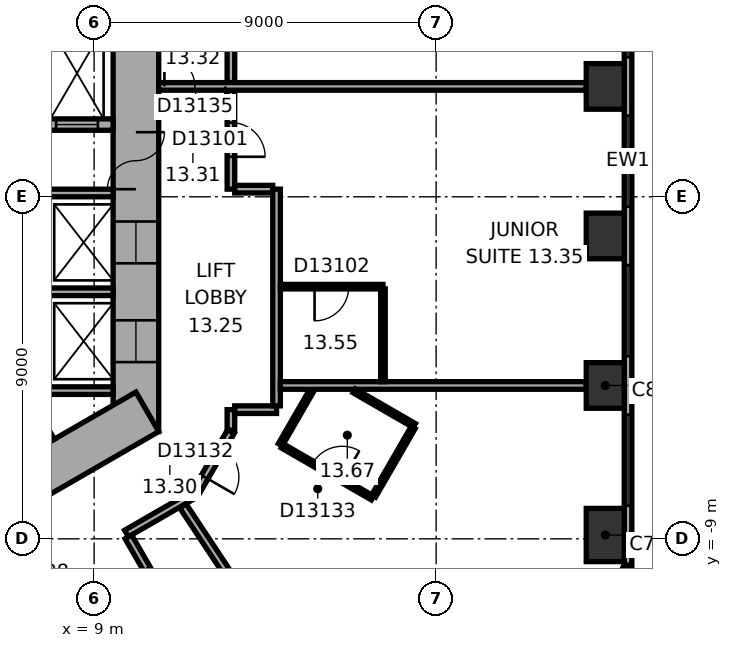
"""IFC4 building model, lengths in metres.
Left out: names, types, materials, properties, quantities, classifications, styles, units other than length and angle.
Written with IfcOpenShell. Run it as: python <this file> out.ifc"""

import sys

from ifc_helpers import new_model, si_unit, direction, frame, frame_2d, origin, origin_2d, place, context, subcontext, project, spatial, rectangle, extrude, element, fill, save


model = new_model("IFC4")
c1 = context("Model", 3, precision=1e-05, world=origin(), true_north=direction((0.0, 1.0)))
c2 = subcontext(c1, "Body", "Model", "MODEL_VIEW")
j1 = project(units=[si_unit("LENGTHUNIT", "METRE"), si_unit("PLANEANGLEUNIT", "RADIAN")], contexts=[c1])
p1 = place(None, origin())
s1 = spatial("IfcSite", under=j1, at=p1, CompositionType="ELEMENT")
p2 = place(p1, origin())
s2 = spatial("IfcBuilding", under=s1, at=p2, CompositionType="ELEMENT")
p3 = place(p2, frame((0.0, 0.0, 63.8)))
s3 = spatial("IfcBuildingStorey", under=s2, at=p3, CompositionType="ELEMENT", Elevation=63.8)
p4 = place(p3, frame((22.45, -8.899, 0.0), z_axis=(0.0, 0.0, 1.0), x_axis=(0.0, 1.0, 0.0)))
e1 = element("IfcColumn", 1, at=p4, inside=s3, PredefinedType="COLUMN", context=c2, shape_type="SweptSolid", body=[
    extrude(rectangle(XDim=1.4, YDim=1.0, at=origin_2d()), origin(), (0.0, 0.0, 1.0), 3.3),
])
for number, where, z_axis, x_axis in (
    (2, (22.45, -4.965, 0.0), (0.0, 0.0, 1.0), (0.0, 1.0, 0.0)),
    (3, (22.45, -1.03, 0.0), (0.0, 0.0, 1.0), (0.0, 1.0, 0.0)),
    (4, (22.45, 2.905, 0.0), (0.0, 0.0, 1.0), (0.0, 1.0, 0.0)),
):
    element("IfcColumn", number, at=place(p3, frame(where, z_axis=z_axis, x_axis=x_axis)), inside=s3, PredefinedType="COLUMN", context=c2, shape_type="SweptSolid", body=[
        extrude(rectangle(XDim=1.2, YDim=1.0, at=origin_2d()), origin(), (0.0, 0.0, 1.0), 3.3),
    ])
p5 = place(p3, frame((10.1, -6.177, 0.0), z_axis=(0.0, 0.0, 1.0), x_axis=(0.0, 1.0, 0.0)))
e5 = element("IfcWall", 5, at=p5, inside=s3, PredefinedType="SHEAR", context=c2, shape_type="SweptSolid", body=[
    extrude(rectangle(XDim=12.355, YDim=1.2, at=frame_2d((6.177, 0.0))), origin(), (0.0, 0.0, 1.0), 3.3),
])
p6 = place(p5, frame((6.378, 0.0, 0.0)))
e6 = element("IfcOpeningElement", 6, at=p6, cuts=e5, PredefinedType="OPENING", context=c2, shape_type="SweptSolid", body=[
    extrude(rectangle(XDim=1.5, YDim=2.1, at=frame_2d((0.75, 1.05))), frame((0.0, 0.61, 0.0), z_axis=(0.0, -1.0, 0.0), x_axis=(1.0, 0.0, 0.0)), (0.0, 0.0, 1.0), 1.22),
])
p7 = place(p5, frame((1.828, 0.0, 0.0)))
e7 = element("IfcOpeningElement", 7, at=p7, cuts=e5, PredefinedType="OPENING", context=c2, shape_type="SweptSolid", body=[
    extrude(rectangle(XDim=1.1, YDim=2.1, at=frame_2d((0.55, 1.05))), frame((0.0, 0.61, 0.0), z_axis=(0.0, -1.0, 0.0), x_axis=(1.0, 0.0, 0.0)), (0.0, 0.0, 1.0), 1.22),
])
p8 = place(p5, frame((4.427, 0.0, 0.0)))
e8 = element("IfcOpeningElement", 8, at=p8, cuts=e5, PredefinedType="OPENING", context=c2, shape_type="SweptSolid", body=[
    extrude(rectangle(XDim=1.1, YDim=2.1, at=frame_2d((0.55, 1.05))), frame((0.0, 0.61, 0.0), z_axis=(0.0, -1.0, 0.0), x_axis=(1.0, 0.0, 0.0)), (0.0, 0.0, 1.0), 1.22),
])
p9 = place(p3, frame((-0.3, -11.836, 0.0), z_axis=(0.0, 0.0, 1.0), x_axis=(0.866021384402, 0.500006961711, 0.0)))
e9 = element("IfcWall", 9, at=p9, inside=s3, PredefinedType="SHEAR", context=c2, shape_type="SweptSolid", body=[
    extrude(rectangle(XDim=12.355, YDim=1.2, at=frame_2d((6.178, 0.0))), origin(), (0.0, 0.0, 1.0), 3.3),
])
p10 = place(p9, frame((4.128, 0.0, 0.0)))
e10 = element("IfcOpeningElement", 10, at=p10, cuts=e9, PredefinedType="OPENING", context=c2, shape_type="SweptSolid", body=[
    extrude(rectangle(XDim=0.9, YDim=2.1, at=frame_2d((0.45, 1.05))), frame((0.0, 0.61, 0.0), z_axis=(0.0, -1.0, 0.0), x_axis=(1.0, 0.0, 0.0)), (0.0, 0.0, 1.0), 1.22),
])
p11 = place(p9, frame((7.928, 0.0, 0.0)))
e11 = element("IfcOpeningElement", 11, at=p11, cuts=e9, PredefinedType="OPENING", context=c2, shape_type="SweptSolid", body=[
    extrude(rectangle(XDim=1.1, YDim=2.1, at=frame_2d((0.55, 1.05))), frame((0.0, 0.61, 0.0), z_axis=(0.0, -1.0, 0.0), x_axis=(1.0, 0.0, 0.0)), (0.0, 0.0, 1.0), 1.22),
])
p12 = place(p3, frame((23.05, -9.687, 0.0), z_axis=(0.0, 0.0, 1.0), x_axis=(0.0, 1.0, 0.0)))
e12 = element("IfcWall", 12, at=p12, inside=s3, PredefinedType="STANDARD", context=c2, shape_type="SweptSolid", body=[
    extrude(rectangle(XDim=21.246, YDim=0.2, at=frame_2d((10.623, 0.0))), origin(), (0.0, 0.0, 1.0), 3.3),
])
p13 = place(p12, frame((1.555, 0.0, 0.8)))
e13 = element("IfcOpeningElement", 13, at=p13, cuts=e12, PredefinedType="OPENING", context=c2, shape_type="SweptSolid", body=[
    extrude(rectangle(XDim=2.4, YDim=1.7, at=frame_2d((1.2, 0.85))), frame((0.0, 0.11, 0.0), z_axis=(0.0, -1.0, 0.0), x_axis=(1.0, 0.0, 0.0)), (0.0, 0.0, 1.0), 0.22),
])
p14 = place(p12, frame((5.489, 0.0, 0.8)))
e14 = element("IfcOpeningElement", 14, at=p14, cuts=e12, PredefinedType="OPENING", context=c2, shape_type="SweptSolid", body=[
    extrude(rectangle(XDim=2.4, YDim=1.7, at=frame_2d((1.2, 0.85))), frame((0.0, 0.11, 0.0), z_axis=(0.0, -1.0, 0.0), x_axis=(1.0, 0.0, 0.0)), (0.0, 0.0, 1.0), 0.22),
])
p15 = place(p12, frame((9.424, 0.0, 0.8)))
e15 = element("IfcOpeningElement", 15, at=p15, cuts=e12, PredefinedType="OPENING", context=c2, shape_type="SweptSolid", body=[
    extrude(rectangle(XDim=2.4, YDim=1.7, at=frame_2d((1.2, 0.85))), frame((0.0, 0.11, 0.0), z_axis=(0.0, -1.0, 0.0), x_axis=(1.0, 0.0, 0.0)), (0.0, 0.0, 1.0), 0.22),
])
p16 = place(p12, frame((13.358, 0.0, 0.8)))
e16 = element("IfcOpeningElement", 16, at=p16, cuts=e12, PredefinedType="OPENING", context=c2, shape_type="SweptSolid", body=[
    extrude(rectangle(XDim=2.4, YDim=1.7, at=frame_2d((1.2, 0.85))), frame((0.0, 0.11, 0.0), z_axis=(0.0, -1.0, 0.0), x_axis=(1.0, 0.0, 0.0)), (0.0, 0.0, 1.0), 0.22),
])
p17 = place(p12, frame((17.293, 0.0, 0.8)))
e17 = element("IfcOpeningElement", 17, at=p17, cuts=e12, PredefinedType="OPENING", context=c2, shape_type="SweptSolid", body=[
    extrude(rectangle(XDim=2.4, YDim=1.7, at=frame_2d((1.2, 0.85))), frame((0.0, 0.11, 0.0), z_axis=(0.0, -1.0, 0.0), x_axis=(1.0, 0.0, 0.0)), (0.0, 0.0, 1.0), 0.22),
])
p18 = place(p3, frame((20.833, -13.839, 0.0), z_axis=(0.0, 0.0, 1.0), x_axis=(0.473321668581, 0.880889662813, 0.0)))
e18 = element("IfcWall", 18, at=p18, inside=s3, PredefinedType="STANDARD", context=c2, shape_type="SweptSolid", body=[
    extrude(rectangle(XDim=4.66, YDim=0.2, at=frame_2d((2.33, 0.0))), origin(), (0.0, 0.0, 1.0), 3.3),
])
p19 = place(p18, frame((0.83, 0.0, 0.8)))
e19 = element("IfcOpeningElement", 19, at=p19, cuts=e18, PredefinedType="OPENING", context=c2, shape_type="SweptSolid", body=[
    extrude(rectangle(XDim=3.0, YDim=1.7, at=frame_2d((1.5, 0.85))), frame((0.0, 0.11, 0.0), z_axis=(0.0, -1.0, 0.0), x_axis=(1.0, 0.0, 0.0)), (0.0, 0.0, 1.0), 0.22),
])
for number, where, z_axis, x_axis in (
    (20, (7.3, -5.1, 0.0), (0.0, 0.0, 1.0), (1.0, 0.0, 0.0)),
    (21, (7.3, -2.5, 0.0), (0.0, 0.0, 1.0), (1.0, 0.0, 0.0)),
    (22, (7.3, 0.1, 0.0), (0.0, 0.0, 1.0), (1.0, 0.0, 0.0)),
    (23, (6.768, -4.522, 0.0), (0.0, 0.0, 1.0), (0.5, -0.866, 0.0)),
):
    element("IfcWall", number, at=place(p3, frame(where, z_axis=z_axis, x_axis=x_axis)), inside=s3, PredefinedType="PARTITIONING", context=c2, shape_type="SweptSolid", body=[
        extrude(rectangle(XDim=2.2, YDim=0.2, at=frame_2d((1.1, 0.0))), origin(), (0.0, 0.0, 1.0), 3.05),
    ])
p20 = place(p3, frame((7.3, 1.9, 0.0), z_axis=(0.0, 0.0, 1.0), x_axis=(1.0, 0.0, 0.0)))
e24 = element("IfcWall", 24, at=p20, inside=s3, PredefinedType="SHEAR", context=c2, shape_type="SweptSolid", body=[
    extrude(rectangle(XDim=2.2, YDim=0.3, at=frame_2d((1.1, 0.0))), origin(), (0.0, 0.0, 1.0), 3.05),
])
p21 = place(p20, frame((0.7, 0.0, 0.0)))
e25 = element("IfcOpeningElement", 25, at=p21, cuts=e24, PredefinedType="OPENING", context=c2, shape_type="SweptSolid", body=[
    extrude(rectangle(XDim=1.1, YDim=2.1, at=frame_2d((0.55, 1.05))), frame((0.0, 0.16, 0.0), z_axis=(0.0, -1.0, 0.0), x_axis=(1.0, 0.0, 0.0)), (0.0, 0.0, 1.0), 0.32),
])
p22 = place(p3, frame((9.852, -8.861, 0.0), z_axis=(0.0, 0.0, 1.0), x_axis=(0.866013291437, 0.500020978615, 0.0)))
e26 = element("IfcWall", 26, at=p22, inside=s3, PredefinedType="PARTITIONING", context=c2, shape_type="SweptSolid", body=[
    extrude(rectangle(XDim=2.077, YDim=0.2, at=frame_2d((1.038, 0.0))), origin(), (0.0, 0.0, 1.0), 3.05),
])
p23 = place(p3, frame((10.402, -9.815, 0.0), z_axis=(0.0, 0.0, 1.0), x_axis=(-0.499968756647, 0.866043441391, 0.0)))
e27 = element("IfcWall", 27, at=p23, inside=s3, PredefinedType="PARTITIONING", context=c2, shape_type="SweptSolid", body=[
    extrude(rectangle(XDim=1.001, YDim=0.2, at=frame_2d((0.5, 0.0))), origin(), (0.0, 0.0, 1.0), 3.05),
])
p24 = place(p3, frame((11.67, -7.788, 0.0), z_axis=(0.0, 0.0, 1.0), x_axis=(0.500063286585, 0.865988862174, 0.0)))
e28 = element("IfcWall", 28, at=p24, inside=s3, PredefinedType="PARTITIONING", context=c2, shape_type="SweptSolid", body=[
    extrude(rectangle(XDim=1.86, YDim=0.2, at=frame_2d((0.93, 0.0))), origin(), (0.0, 0.0, 1.0), 3.05),
])
p25 = place(p24, frame((0.48, 0.0, 0.0)))
e29 = element("IfcOpeningElement", 29, at=p25, cuts=e28, PredefinedType="OPENING", context=c2, shape_type="SweptSolid", body=[
    extrude(rectangle(XDim=0.9, YDim=2.1, at=frame_2d((0.45, 1.05))), frame((0.0, 0.11, 0.0), z_axis=(0.0, -1.0, 0.0), x_axis=(1.0, 0.0, 0.0)), (0.0, 0.0, 1.0), 0.22),
])
p26 = place(p3, frame((12.6, -6.138, 0.0), z_axis=(0.0, 0.0, 1.0), x_axis=(0.0, 1.0, 0.0)))
e30 = element("IfcWall", 30, at=p26, inside=s3, PredefinedType="PARTITIONING", context=c2, shape_type="SweptSolid", body=[
    extrude(rectangle(XDim=0.537, YDim=0.2, at=frame_2d((0.268, 0.0))), origin(), (0.0, 0.0, 1.0), 3.05),
])
p27 = place(p3, frame((12.6, 0.201, 0.0), z_axis=(0.0, 0.0, 1.0), x_axis=(0.0, 1.0, 0.0)))
e31 = element("IfcWall", 31, at=p27, inside=s3, PredefinedType="PARTITIONING", context=c2, shape_type="SweptSolid", body=[
    extrude(rectangle(XDim=2.604, YDim=0.2, at=frame_2d((1.302, 0.0))), origin(), (0.0, 0.0, 1.0), 3.05),
])
p28 = place(p27, frame((0.852, 0.0, 0.0)))
e32 = element("IfcOpeningElement", 32, at=p28, cuts=e31, PredefinedType="OPENING", context=c2, shape_type="SweptSolid", body=[
    extrude(rectangle(XDim=0.9, YDim=2.1, at=frame_2d((0.45, 1.05))), frame((0.0, 0.11, 0.0), z_axis=(0.0, -1.0, 0.0), x_axis=(1.0, 0.0, 0.0)), (0.0, 0.0, 1.0), 0.22),
])
p29 = place(p3, frame((12.6, 3.004, 0.0), z_axis=(0.0, 0.0, 1.0), x_axis=(0.0, 1.0, 0.0)))
e33 = element("IfcWall", 33, at=p29, inside=s3, PredefinedType="PARTITIONING", context=c2, shape_type="SweptSolid", body=[
    extrude(rectangle(XDim=3.173, YDim=0.2, at=frame_2d((1.586, 0.0))), origin(), (0.0, 0.0, 1.0), 3.05),
])
p30 = place(p29, frame((1.136, 0.0, 0.0)))
e34 = element("IfcOpeningElement", 34, at=p30, cuts=e33, PredefinedType="OPENING", context=c2, shape_type="SweptSolid", body=[
    extrude(rectangle(XDim=0.9, YDim=2.1, at=frame_2d((0.45, 1.05))), frame((0.0, 0.11, 0.0), z_axis=(0.0, -1.0, 0.0), x_axis=(1.0, 0.0, 0.0)), (0.0, 0.0, 1.0), 0.22),
])
p31 = place(p3, frame((12.7, -5.601, 0.0), z_axis=(0.0, 0.0, 1.0), x_axis=(1.0, 0.0, 0.0)))
e35 = element("IfcWall", 35, at=p31, inside=s3, PredefinedType="PARTITIONING", context=c2, shape_type="SweptSolid", body=[
    extrude(rectangle(XDim=1.101, YDim=0.2, at=frame_2d((0.551, 0.0))), origin(), (0.0, 0.0, 1.0), 3.05),
])
p32 = place(p3, frame((13.701, 0.201, 0.0), z_axis=(0.0, 0.0, 1.0), x_axis=(-1.0, 0.0, 0.0)))
e36 = element("IfcWall", 36, at=p32, inside=s3, PredefinedType="PARTITIONING", context=c2, shape_type="SweptSolid", body=[
    extrude(rectangle(XDim=1.001, YDim=0.2, at=frame_2d((0.5, 0.0))), origin(), (0.0, 0.0, 1.0), 3.05),
])
p33 = place(p3, frame((13.801, -5.501, 0.0), z_axis=(0.0, 0.0, 1.0), x_axis=(0.0, 1.0, 0.0)))
e37 = element("IfcWall", 37, at=p33, inside=s3, PredefinedType="PARTITIONING", context=c2, shape_type="SweptSolid", body=[
    extrude(rectangle(XDim=5.702, YDim=0.2, at=frame_2d((2.851, 0.0))), origin(), (0.0, 0.0, 1.0), 3.05),
])
p34 = place(p3, frame((13.901, -6.524, 0.0), z_axis=(0.0, 0.0, 1.0), x_axis=(0.499964162598, 0.86604609353, 0.0)))
e38 = element("IfcWall", 38, at=p34, inside=s3, PredefinedType="PARTITIONING", context=c2, shape_type="SweptSolid", body=[
    extrude(rectangle(XDim=1.661, YDim=0.12, at=frame_2d((0.831, 0.0))), origin(), (0.0, 0.0, 1.0), 3.05),
])
p35 = place(p3, frame((13.901, -4.965, 0.0), z_axis=(0.0, 0.0, 1.0), x_axis=(1.0, 0.0, 0.0)))
e39 = element("IfcWall", 39, at=p35, inside=s3, PredefinedType="PARTITIONING", context=c2, shape_type="SweptSolid", body=[
    extrude(rectangle(XDim=8.049, YDim=0.2, at=frame_2d((4.024, 0.0))), origin(), (0.0, 0.0, 1.0), 3.05),
])
p36 = place(p3, frame((13.901, -2.365, 0.0), z_axis=(0.0, 0.0, 1.0), x_axis=(1.0, 0.0, 0.0)))
e40 = element("IfcWall", 40, at=p36, inside=s3, PredefinedType="PARTITIONING", context=c2, shape_type="SweptSolid", body=[
    extrude(rectangle(XDim=2.7, YDim=0.12, at=frame_2d((1.35, 0.0))), origin(), (0.0, 0.0, 1.0), 3.05),
])
p37 = place(p36, frame((0.9, 0.0, 0.0)))
e41 = element("IfcOpeningElement", 41, at=p37, cuts=e40, PredefinedType="OPENING", context=c2, shape_type="SweptSolid", body=[
    extrude(rectangle(XDim=0.9, YDim=2.1, at=frame_2d((0.45, 1.05))), frame((0.0, 0.07, 0.0), z_axis=(0.0, -1.0, 0.0), x_axis=(1.0, 0.0, 0.0)), (0.0, 0.0, 1.0), 0.14),
])
p38 = place(p3, frame((15.841, -5.104, 0.0), z_axis=(0.0, 0.0, 1.0), x_axis=(0.866025591402, -0.499999675036, 0.0)))
e42 = element("IfcWall", 42, at=p38, inside=s3, PredefinedType="PARTITIONING", context=c2, shape_type="SweptSolid", body=[
    extrude(rectangle(XDim=1.83, YDim=0.12, at=frame_2d((0.915, 0.0))), origin(), (0.0, 0.0, 1.0), 3.05),
])
p39 = place(p3, frame((16.255, -15.564, 0.0), z_axis=(0.0, 0.0, 1.0), x_axis=(-0.55192208744, 0.833895682562, 0.0)))
e43 = element("IfcWall", 43, at=p39, inside=s3, PredefinedType="PARTITIONING", context=c2, shape_type="SweptSolid", body=[
    extrude(rectangle(XDim=8.913, YDim=0.2, at=frame_2d((4.457, 0.0))), origin(), (0.0, 0.0, 1.0), 2.6),
])
p40 = place(p3, frame((16.326, -7.925, 0.0), z_axis=(0.0, 0.0, 1.0), x_axis=(-0.865997131366, 0.500048966069, 0.0)))
e44 = element("IfcWall", 44, at=p40, inside=s3, PredefinedType="PARTITIONING", context=c2, shape_type="SweptSolid", body=[
    extrude(rectangle(XDim=2.74, YDim=0.12, at=frame_2d((1.37, 0.0))), origin(), (0.0, 0.0, 1.0), 3.05),
])
p41 = place(p40, frame((0.92, 0.0, 0.0)))
e45 = element("IfcOpeningElement", 45, at=p41, cuts=e44, PredefinedType="OPENING", context=c2, shape_type="SweptSolid", body=[
    extrude(rectangle(XDim=0.9, YDim=2.1, at=frame_2d((0.45, 1.05))), frame((0.0, 0.07, 0.0), z_axis=(0.0, -1.0, 0.0), x_axis=(1.0, 0.0, 0.0)), (0.0, 0.0, 1.0), 0.14),
])
p42 = place(p3, frame((16.601, -2.425, 0.0), z_axis=(0.0, 0.0, 1.0), x_axis=(0.0, -1.0, 0.0)))
e46 = element("IfcWall", 46, at=p42, inside=s3, PredefinedType="PARTITIONING", context=c2, shape_type="SweptSolid", body=[
    extrude(rectangle(XDim=2.44, YDim=0.12, at=frame_2d((1.22, 0.0))), origin(), (0.0, 0.0, 1.0), 3.05),
])
p43 = place(p3, frame((17.396, -6.071, 0.0), z_axis=(0.0, 0.0, 1.0), x_axis=(-0.500027264788, -0.866009661879, 0.0)))
e47 = element("IfcWall", 47, at=p43, inside=s3, PredefinedType="PARTITIONING", context=c2, shape_type="SweptSolid", body=[
    extrude(rectangle(XDim=2.08, YDim=0.12, at=frame_2d((1.04, 0.0))), origin(), (0.0, 0.0, 1.0), 3.05),
])
p44 = place(p3, frame((21.95, 2.905, 0.0), z_axis=(0.0, 0.0, 1.0), x_axis=(-1.0, 0.0, 0.0)))
e48 = element("IfcWall", 48, at=p44, inside=s3, PredefinedType="PARTITIONING", context=c2, shape_type="SweptSolid", body=[
    extrude(rectangle(XDim=11.25, YDim=0.2, at=frame_2d((5.625, 0.0))), origin(), (0.0, 0.0, 1.0), 3.05),
])
p45 = place(p44, frame((9.5, 0.0, 0.0)))
e49 = element("IfcOpeningElement", 49, at=p45, cuts=e48, PredefinedType="OPENING", context=c2, shape_type="SweptSolid", body=[
    extrude(rectangle(XDim=1.6, YDim=2.1, at=frame_2d((0.8, 1.05))), frame((0.0, 0.11, 0.0), z_axis=(0.0, -1.0, 0.0), x_axis=(1.0, 0.0, 0.0)), (0.0, 0.0, 1.0), 0.22),
])
p46 = place(p13, origin())
e50 = element("IfcWindow", 50, at=p46, inside=s3, PartitioningType="SINGLE_PANEL", PredefinedType="WINDOW", context=c2, shape_type="SweptSolid", body=[
    extrude(rectangle(XDim=2.4, YDim=1.7, at=frame_2d((1.2, 0.85))), frame((0.0, 0.03, 0.0), z_axis=(0.0, -1.0, 0.0), x_axis=(1.0, 0.0, 0.0)), (0.0, 0.0, 1.0), 0.06),
])
fill(e13, e50)
p47 = place(p14, origin())
e51 = element("IfcWindow", 51, at=p47, inside=s3, PartitioningType="SINGLE_PANEL", PredefinedType="WINDOW", context=c2, shape_type="SweptSolid", body=[
    extrude(rectangle(XDim=2.4, YDim=1.7, at=frame_2d((1.2, 0.85))), frame((0.0, 0.03, 0.0), z_axis=(0.0, -1.0, 0.0), x_axis=(1.0, 0.0, 0.0)), (0.0, 0.0, 1.0), 0.06),
])
fill(e14, e51)
p48 = place(p15, origin())
e52 = element("IfcWindow", 52, at=p48, inside=s3, PartitioningType="SINGLE_PANEL", PredefinedType="WINDOW", context=c2, shape_type="SweptSolid", body=[
    extrude(rectangle(XDim=2.4, YDim=1.7, at=frame_2d((1.2, 0.85))), frame((0.0, 0.03, 0.0), z_axis=(0.0, -1.0, 0.0), x_axis=(1.0, 0.0, 0.0)), (0.0, 0.0, 1.0), 0.06),
])
fill(e15, e52)
p49 = place(p16, origin())
e53 = element("IfcWindow", 53, at=p49, inside=s3, PartitioningType="SINGLE_PANEL", PredefinedType="WINDOW", context=c2, shape_type="SweptSolid", body=[
    extrude(rectangle(XDim=2.4, YDim=1.7, at=frame_2d((1.2, 0.85))), frame((0.0, 0.03, 0.0), z_axis=(0.0, -1.0, 0.0), x_axis=(1.0, 0.0, 0.0)), (0.0, 0.0, 1.0), 0.06),
])
fill(e16, e53)
p50 = place(p6, origin())
e54 = element("IfcDoor", 54, at=p50, inside=s3, OperationType="DOUBLE_DOOR_SINGLE_SWING", PredefinedType="DOOR", context=c2, shape_type="SweptSolid", body=[
    extrude(rectangle(XDim=1.5, YDim=2.1, at=frame_2d((0.75, 1.05))), frame((0.0, 0.025, 0.0), z_axis=(0.0, -1.0, 0.0), x_axis=(1.0, 0.0, 0.0)), (0.0, 0.0, 1.0), 0.05),
])
fill(e6, e54)
p51 = place(p21, origin())
e55 = element("IfcDoor", 55, at=p51, inside=s3, OperationType="DOUBLE_DOOR_SLIDING", PredefinedType="DOOR", context=c2, shape_type="SweptSolid", body=[
    extrude(rectangle(XDim=1.1, YDim=2.1, at=frame_2d((0.55, 1.05))), frame((0.0, 0.025, 0.0), z_axis=(0.0, -1.0, 0.0), x_axis=(1.0, 0.0, 0.0)), (0.0, 0.0, 1.0), 0.05),
])
fill(e25, e55)
p52 = place(p7, origin())
e56 = element("IfcDoor", 56, at=p52, inside=s3, OperationType="DOUBLE_DOOR_SLIDING", PredefinedType="DOOR", context=c2, shape_type="SweptSolid", body=[
    extrude(rectangle(XDim=1.1, YDim=2.1, at=frame_2d((0.55, 1.05))), frame((0.0, 0.025, 0.0), z_axis=(0.0, -1.0, 0.0), x_axis=(1.0, 0.0, 0.0)), (0.0, 0.0, 1.0), 0.05),
])
fill(e7, e56)
p53 = place(p8, origin())
e57 = element("IfcDoor", 57, at=p53, inside=s3, OperationType="DOUBLE_DOOR_SLIDING", PredefinedType="DOOR", context=c2, shape_type="SweptSolid", body=[
    extrude(rectangle(XDim=1.1, YDim=2.1, at=frame_2d((0.55, 1.05))), frame((0.0, 0.025, 0.0), z_axis=(0.0, -1.0, 0.0), x_axis=(1.0, 0.0, 0.0)), (0.0, 0.0, 1.0), 0.05),
])
fill(e8, e57)
p54 = place(p28, origin())
e58 = element("IfcDoor", 58, at=p54, inside=s3, OperationType="SINGLE_SWING_LEFT", PredefinedType="DOOR", context=c2, shape_type="SweptSolid", body=[
    extrude(rectangle(XDim=0.9, YDim=2.1, at=frame_2d((0.45, 1.05))), frame((0.0, 0.025, 0.0), z_axis=(0.0, -1.0, 0.0), x_axis=(1.0, 0.0, 0.0)), (0.0, 0.0, 1.0), 0.05),
])
fill(e32, e58)
p55 = place(p37, origin())
e59 = element("IfcDoor", 59, at=p55, inside=s3, OperationType="SINGLE_SWING_LEFT", PredefinedType="DOOR", context=c2, shape_type="SweptSolid", body=[
    extrude(rectangle(XDim=0.9, YDim=2.1, at=frame_2d((0.45, 1.05))), frame((0.0, 0.025, 0.0), z_axis=(0.0, -1.0, 0.0), x_axis=(1.0, 0.0, 0.0)), (0.0, 0.0, 1.0), 0.05),
])
fill(e41, e59)
p56 = place(p25, origin())
e60 = element("IfcDoor", 60, at=p56, inside=s3, OperationType="SINGLE_SWING_LEFT", PredefinedType="DOOR", context=c2, shape_type="SweptSolid", body=[
    extrude(rectangle(XDim=0.9, YDim=2.1, at=frame_2d((0.45, 1.05))), frame((0.0, 0.025, 0.0), z_axis=(0.0, -1.0, 0.0), x_axis=(1.0, 0.0, 0.0)), (0.0, 0.0, 1.0), 0.05),
])
fill(e29, e60)
p57 = place(p41, origin())
e61 = element("IfcDoor", 61, at=p57, inside=s3, OperationType="SINGLE_SWING_LEFT", PredefinedType="DOOR", context=c2, shape_type="SweptSolid", body=[
    extrude(rectangle(XDim=0.9, YDim=2.1, at=frame_2d((0.45, 1.05))), frame((0.0, 0.025, 0.0), z_axis=(0.0, -1.0, 0.0), x_axis=(1.0, 0.0, 0.0)), (0.0, 0.0, 1.0), 0.05),
])
fill(e45, e61)
p58 = place(p45, origin())
e62 = element("IfcDoor", 62, at=p58, inside=s3, OperationType="DOUBLE_DOOR_SINGLE_SWING", PredefinedType="DOOR", context=c2, shape_type="SweptSolid", body=[
    extrude(rectangle(XDim=1.6, YDim=2.1, at=frame_2d((0.8, 1.05))), frame((0.0, 0.025, 0.0), z_axis=(0.0, -1.0, 0.0), x_axis=(1.0, 0.0, 0.0)), (0.0, 0.0, 1.0), 0.05),
])
fill(e49, e62)
save(model, sys.argv[1])
